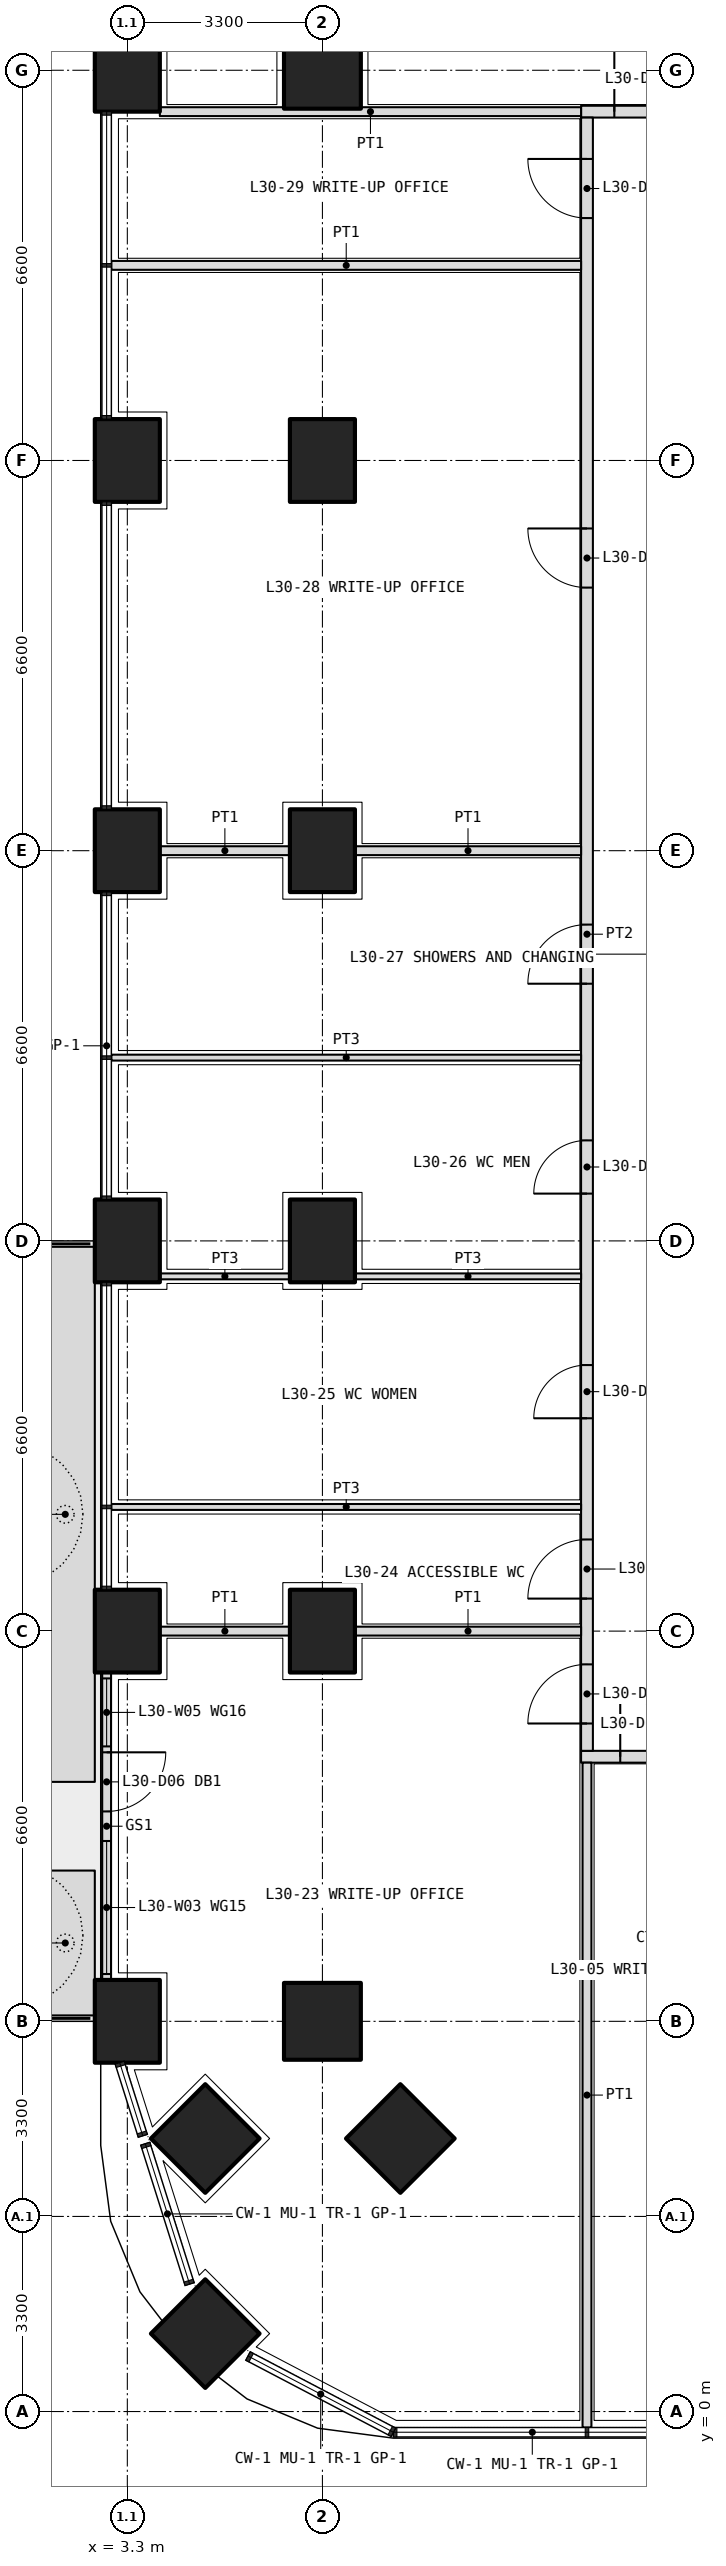
"""IFC4 building model, lengths in metres.
Left out: names, types, materials, properties, quantities, classifications, styles, units other than length and angle.
Written with IfcOpenShell. Run it as: python <this file> out.ifc"""

import sys

from ifc_helpers import new_model, si_unit, direction, frame, frame_2d, origin, origin_2d, place, context, subcontext, project, spatial, polyline, rectangle, outline, extrude, element, fill, save


model = new_model("IFC4")
c1 = context("Model", 3, precision=1e-05, world=origin(), true_north=direction((0.0, 1.0)))
c2 = subcontext(c1, "Body", "Model", "MODEL_VIEW")
j1 = project(units=[si_unit("LENGTHUNIT", "METRE"), si_unit("PLANEANGLEUNIT", "RADIAN")], contexts=[c1])
p1 = place(None, origin())
s1 = spatial("IfcSite", under=j1, at=p1, CompositionType="ELEMENT")
p2 = place(p1, origin())
s2 = spatial("IfcBuilding", under=s1, at=p2, CompositionType="ELEMENT")
p3 = place(p2, frame((0.0, 0.0, 132.6)))
s3 = spatial("IfcBuildingStorey", under=s2, at=p3, CompositionType="ELEMENT", Elevation=132.6)
p4 = place(p3, frame((4.618, 1.318, 0.0), z_axis=(0.0, 0.0, 1.0), x_axis=(0.707106781187, 0.707106781187, 0.0)))
e1 = element("IfcColumn", 1, at=p4, inside=s3, PredefinedType="COLUMN", context=c2, shape_type="SweptSolid", body=[
    extrude(rectangle(XDim=1.3, YDim=1.3, at=origin_2d()), origin(), (0.0, 0.0, 1.0), 4.2),
])
for number, where, z_axis, x_axis in (
    (2, (3.3, 6.6, 0.0), (0.0, 0.0, 1.0), (0.0, 1.0, 0.0)),
    (3, (3.3, 13.2, 0.0), (0.0, 0.0, 1.0), (0.0, 1.0, 0.0)),
    (4, (3.3, 19.8, 0.0), (0.0, 0.0, 1.0), (0.0, 1.0, 0.0)),
    (5, (3.3, 26.4, 0.0), (0.0, 0.0, 1.0), (0.0, 1.0, 0.0)),
    (6, (3.3, 33.0, 0.0), (0.0, 0.0, 1.0), (0.0, 1.0, 0.0)),
    (7, (3.3, 39.6, 0.0), (0.0, 0.0, 1.0), (0.0, 1.0, 0.0)),
):
    element("IfcColumn", number, at=place(p3, frame(where, z_axis=z_axis, x_axis=x_axis)), inside=s3, PredefinedType="COLUMN", context=c2, shape_type="SweptSolid", body=[
        extrude(rectangle(XDim=1.4, YDim=1.1, at=origin_2d()), origin(), (0.0, 0.0, 1.0), 4.2),
    ])
for number, where, z_axis, x_axis in (
    (8, (6.6, 6.6, 0.0), (0.0, 0.0, 1.0), (1.0, 0.0, 0.0)),
    (9, (6.6, 39.6, 0.0), (0.0, 0.0, 1.0), (1.0, 0.0, 0.0)),
    (10, (4.618, 4.618, 0.0), (0.0, 0.0, 1.0), (0.707, 0.707, 0.0)),
    (11, (7.918, 4.618, 0.0), (0.0, 0.0, 1.0), (0.707, 0.707, 0.0)),
):
    element("IfcColumn", number, at=place(p3, frame(where, z_axis=z_axis, x_axis=x_axis)), inside=s3, PredefinedType="COLUMN", context=c2, shape_type="SweptSolid", body=[
        extrude(rectangle(XDim=1.3, YDim=1.3, at=origin_2d()), origin(), (0.0, 0.0, 1.0), 4.2),
    ])
for number, where, z_axis, x_axis in (
    (12, (6.6, 13.2, 0.0), (0.0, 0.0, 1.0), (0.0, 1.0, 0.0)),
    (13, (6.6, 19.8, 0.0), (0.0, 0.0, 1.0), (0.0, 1.0, 0.0)),
    (14, (6.6, 26.4, 0.0), (0.0, 0.0, 1.0), (0.0, 1.0, 0.0)),
    (15, (6.6, 33.0, 0.0), (0.0, 0.0, 1.0), (0.0, 1.0, 0.0)),
):
    element("IfcColumn", number, at=place(p3, frame(where, z_axis=z_axis, x_axis=x_axis)), inside=s3, PredefinedType="COLUMN", context=c2, shape_type="SweptSolid", body=[
        extrude(rectangle(XDim=1.4, YDim=1.1, at=origin_2d()), origin(), (0.0, 0.0, 1.0), 4.2),
    ])
p5 = place(p3, origin())
e16 = element("IfcWall", 16, at=p5, inside=s3, PredefinedType="USERDEFINED", context=c2, shape_type="SweptSolid", body=[
    extrude(outline(polyline([(1.75, 6.7), (2.75, 6.7), (2.75, 9.15), (1.75, 9.15), (1.75, 6.7)]), holes=[polyline([(1.9, 6.85), (2.6, 6.85), (2.6, 9.0), (1.9, 9.0), (1.9, 6.85)])]), origin(), (0.0, 0.0, 1.0), 1.05),
])
p6 = place(p3, origin())
e17 = element("IfcWall", 17, at=p6, inside=s3, PredefinedType="USERDEFINED", context=c2, shape_type="SweptSolid", body=[
    extrude(outline(polyline([(1.75, 10.65), (2.75, 10.65), (2.75, 19.7), (1.75, 19.7), (1.75, 10.65)]), holes=[polyline([(1.9, 10.8), (2.6, 10.8), (2.6, 19.55), (1.9, 19.55), (1.9, 10.8)])]), origin(), (0.0, 0.0, 1.0), 1.05),
])
p7 = place(p3, frame((2.95, 12.5, 0.0), z_axis=(0.0, 0.0, 1.0), x_axis=(0.0, -1.0, 0.0)))
e18 = element("IfcWall", 18, at=p7, inside=s3, PredefinedType="SOLIDWALL", context=c2, shape_type="SweptSolid", body=[
    extrude(rectangle(XDim=5.2, YDim=0.15, at=frame_2d((2.6, 0.0))), origin(), (0.0, 0.0, 1.0), 2.7),
])
p8 = place(p7, frame((1.35, 0.0, 0.0)))
e19 = element("IfcOpeningElement", 19, at=p8, cuts=e18, PredefinedType="OPENING", context=c2, shape_type="SweptSolid", body=[
    extrude(rectangle(XDim=1.0, YDim=2.4, at=frame_2d((0.5, 1.2))), frame((0.0, 0.085, 0.0), z_axis=(0.0, -1.0, 0.0), x_axis=(1.0, 0.0, 0.0)), (0.0, 0.0, 1.0), 0.17),
])
p9 = place(p7, frame((0.1, 0.0, 0.1)))
e20 = element("IfcOpeningElement", 20, at=p9, cuts=e18, PredefinedType="OPENING", context=c2, shape_type="SweptSolid", body=[
    extrude(rectangle(XDim=1.15, YDim=2.3, at=frame_2d((0.575, 1.15))), frame((0.0, 0.085, 0.0), z_axis=(0.0, -1.0, 0.0), x_axis=(1.0, 0.0, 0.0)), (0.0, 0.0, 1.0), 0.17),
])
p10 = place(p7, frame((2.85, 0.0, 0.1)))
e21 = element("IfcOpeningElement", 21, at=p10, cuts=e18, PredefinedType="OPENING", context=c2, shape_type="SweptSolid", body=[
    extrude(rectangle(XDim=2.25, YDim=2.3, at=frame_2d((1.125, 1.15))), frame((0.0, 0.085, 0.0), z_axis=(0.0, -1.0, 0.0), x_axis=(1.0, 0.0, 0.0)), (0.0, 0.0, 1.0), 0.17),
])
p11 = place(p3, frame((10.975, 11.075, 0.0), z_axis=(0.0, 0.0, 1.0), x_axis=(1.0, 0.0, 0.0)))
e22 = element("IfcWall", 22, at=p11, inside=s3, PredefinedType="PARTITIONING", context=c2, shape_type="SweptSolid", body=[
    extrude(rectangle(XDim=12.125, YDim=0.2, at=frame_2d((6.062, 0.0))), origin(), (0.0, 0.0, 1.0), 2.85),
])
p12 = place(p11, frame((0.663, 0.0, 0.0)))
e23 = element("IfcOpeningElement", 23, at=p12, cuts=e22, PredefinedType="OPENING", context=c2, shape_type="SweptSolid", body=[
    extrude(rectangle(XDim=1.0, YDim=2.1, at=frame_2d((0.5, 1.05))), frame((0.0, 0.11, 0.0), z_axis=(0.0, -1.0, 0.0), x_axis=(1.0, 0.0, 0.0)), (0.0, 0.0, 1.0), 0.22),
])
p13 = place(p11, frame((6.675, 0.0, 0.0)))
e24 = element("IfcOpeningElement", 24, at=p13, cuts=e22, PredefinedType="OPENING", context=c2, shape_type="SweptSolid", body=[
    extrude(rectangle(XDim=1.0, YDim=2.1, at=frame_2d((0.5, 1.05))), frame((0.0, 0.11, 0.0), z_axis=(0.0, -1.0, 0.0), x_axis=(1.0, 0.0, 0.0)), (0.0, 0.0, 1.0), 0.22),
])
p14 = place(p3, frame((10.975, 38.9, 0.0), z_axis=(0.0, 0.0, 1.0), x_axis=(1.0, 0.0, 0.0)))
e25 = element("IfcWall", 25, at=p14, inside=s3, PredefinedType="PARTITIONING", context=c2, shape_type="SweptSolid", body=[
    extrude(rectangle(XDim=30.85, YDim=0.2, at=frame_2d((15.425, 0.0))), origin(), (0.0, 0.0, 1.0), 2.85),
])
p15 = place(p14, frame((0.562, 0.0, 0.0)))
e26 = element("IfcOpeningElement", 26, at=p15, cuts=e25, PredefinedType="OPENING", context=c2, shape_type="SweptSolid", body=[
    extrude(rectangle(XDim=1.2, YDim=2.1, at=frame_2d((0.6, 1.05))), frame((0.0, 0.11, 0.0), z_axis=(0.0, -1.0, 0.0), x_axis=(1.0, 0.0, 0.0)), (0.0, 0.0, 1.0), 0.22),
])
p16 = place(p14, frame((6.675, 0.0, 0.0)))
e27 = element("IfcOpeningElement", 27, at=p16, cuts=e25, PredefinedType="OPENING", context=c2, shape_type="SweptSolid", body=[
    extrude(rectangle(XDim=1.0, YDim=2.1, at=frame_2d((0.5, 1.05))), frame((0.0, 0.11, 0.0), z_axis=(0.0, -1.0, 0.0), x_axis=(1.0, 0.0, 0.0)), (0.0, 0.0, 1.0), 0.22),
])
p17 = place(p14, frame((16.575, 0.0, 0.0)))
e28 = element("IfcOpeningElement", 28, at=p17, cuts=e25, PredefinedType="OPENING", context=c2, shape_type="SweptSolid", body=[
    extrude(rectangle(XDim=1.0, YDim=2.1, at=frame_2d((0.5, 1.05))), frame((0.0, 0.11, 0.0), z_axis=(0.0, -1.0, 0.0), x_axis=(1.0, 0.0, 0.0)), (0.0, 0.0, 1.0), 0.22),
])
p18 = place(p14, frame((25.887, 0.0, 0.0)))
e29 = element("IfcOpeningElement", 29, at=p18, cuts=e25, PredefinedType="OPENING", context=c2, shape_type="SweptSolid", body=[
    extrude(rectangle(XDim=1.0, YDim=2.1, at=frame_2d((0.5, 1.05))), frame((0.0, 0.11, 0.0), z_axis=(0.0, -1.0, 0.0), x_axis=(1.0, 0.0, 0.0)), (0.0, 0.0, 1.0), 0.22),
])
p19 = place(p3, frame((11.075, 11.175, 0.0), z_axis=(0.0, 0.0, 1.0), x_axis=(0.0, 1.0, 0.0)))
e30 = element("IfcWall", 30, at=p19, inside=s3, PredefinedType="PARTITIONING", context=c2, shape_type="SweptSolid", body=[
    extrude(rectangle(XDim=27.625, YDim=0.2, at=frame_2d((13.812, 0.0))), origin(), (0.0, 0.0, 1.0), 2.85),
])
p20 = place(p19, frame((0.462, 0.0, 0.0)))
e31 = element("IfcOpeningElement", 31, at=p20, cuts=e30, PredefinedType="OPENING", context=c2, shape_type="SweptSolid", body=[
    extrude(rectangle(XDim=1.0, YDim=2.1, at=frame_2d((0.5, 1.05))), frame((0.0, 0.11, 0.0), z_axis=(0.0, -1.0, 0.0), x_axis=(1.0, 0.0, 0.0)), (0.0, 0.0, 1.0), 0.22),
])
p21 = place(p19, frame((2.575, 0.0, 0.0)))
e32 = element("IfcOpeningElement", 32, at=p21, cuts=e30, PredefinedType="OPENING", context=c2, shape_type="SweptSolid", body=[
    extrude(rectangle(XDim=1.0, YDim=2.1, at=frame_2d((0.5, 1.05))), frame((0.0, 0.11, 0.0), z_axis=(0.0, -1.0, 0.0), x_axis=(1.0, 0.0, 0.0)), (0.0, 0.0, 1.0), 0.22),
])
p22 = place(p19, frame((5.625, 0.0, 0.0)))
e33 = element("IfcOpeningElement", 33, at=p22, cuts=e30, PredefinedType="OPENING", context=c2, shape_type="SweptSolid", body=[
    extrude(rectangle(XDim=0.9, YDim=2.1, at=frame_2d((0.45, 1.05))), frame((0.0, 0.11, 0.0), z_axis=(0.0, -1.0, 0.0), x_axis=(1.0, 0.0, 0.0)), (0.0, 0.0, 1.0), 0.22),
])
p23 = place(p19, frame((9.425, 0.0, 0.0)))
e34 = element("IfcOpeningElement", 34, at=p23, cuts=e30, PredefinedType="OPENING", context=c2, shape_type="SweptSolid", body=[
    extrude(rectangle(XDim=0.9, YDim=2.1, at=frame_2d((0.45, 1.05))), frame((0.0, 0.11, 0.0), z_axis=(0.0, -1.0, 0.0), x_axis=(1.0, 0.0, 0.0)), (0.0, 0.0, 1.0), 0.22),
])
p24 = place(p19, frame((12.975, 0.0, 0.0)))
e35 = element("IfcOpeningElement", 35, at=p24, cuts=e30, PredefinedType="OPENING", context=c2, shape_type="SweptSolid", body=[
    extrude(rectangle(XDim=1.0, YDim=2.1, at=frame_2d((0.5, 1.05))), frame((0.0, 0.11, 0.0), z_axis=(0.0, -1.0, 0.0), x_axis=(1.0, 0.0, 0.0)), (0.0, 0.0, 1.0), 0.22),
])
p25 = place(p19, frame((19.675, 0.0, 0.0)))
e36 = element("IfcOpeningElement", 36, at=p25, cuts=e30, PredefinedType="OPENING", context=c2, shape_type="SweptSolid", body=[
    extrude(rectangle(XDim=1.0, YDim=2.1, at=frame_2d((0.5, 1.05))), frame((0.0, 0.11, 0.0), z_axis=(0.0, -1.0, 0.0), x_axis=(1.0, 0.0, 0.0)), (0.0, 0.0, 1.0), 0.22),
])
p26 = place(p19, frame((25.925, 0.0, 0.0)))
e37 = element("IfcOpeningElement", 37, at=p26, cuts=e30, PredefinedType="OPENING", context=c2, shape_type="SweptSolid", body=[
    extrude(rectangle(XDim=1.0, YDim=2.1, at=frame_2d((0.5, 1.05))), frame((0.0, 0.11, 0.0), z_axis=(0.0, -1.0, 0.0), x_axis=(1.0, 0.0, 0.0)), (0.0, 0.0, 1.0), 0.22),
])
p27 = place(p3, frame((11.075, -0.27, 0.0), z_axis=(0.0, 0.0, 1.0), x_axis=(0.0, 1.0, 0.0)))
e38 = element("IfcWall", 38, at=p27, inside=s3, PredefinedType="PARTITIONING", context=c2, shape_type="SweptSolid", body=[
    extrude(rectangle(XDim=11.245, YDim=0.15, at=frame_2d((5.623, 0.0))), origin(), (0.0, 0.0, 1.0), 2.7),
])
p28 = place(p3, frame((3.85, 38.9, 0.0), z_axis=(0.0, 0.0, 1.0), x_axis=(1.0, 0.0, 0.0)))
e39 = element("IfcWall", 39, at=p28, inside=s3, PredefinedType="PARTITIONING", context=c2, shape_type="SweptSolid", body=[
    extrude(rectangle(XDim=7.125, YDim=0.15, at=frame_2d((3.562, 0.0))), origin(), (0.0, 0.0, 1.0), 2.85),
])
p29 = place(p3, frame((3.03, 15.3, 0.0), z_axis=(0.0, 0.0, 1.0), x_axis=(1.0, 0.0, 0.0)))
e40 = element("IfcWall", 40, at=p29, inside=s3, PredefinedType="PARTITIONING", context=c2, shape_type="SweptSolid", body=[
    extrude(rectangle(XDim=7.945, YDim=0.1, at=frame_2d((3.973, 0.0))), origin(), (0.0, 0.0, 1.0), 2.7),
])
p30 = place(p3, frame((3.85, 19.2, 0.0), z_axis=(0.0, 0.0, 1.0), x_axis=(1.0, 0.0, 0.0)))
e41 = element("IfcWall", 41, at=p30, inside=s3, PredefinedType="PARTITIONING", context=c2, shape_type="SweptSolid", body=[
    extrude(rectangle(XDim=2.2, YDim=0.1, at=frame_2d((1.1, 0.0))), origin(), (0.0, 0.0, 1.0), 2.85),
])
p31 = place(p3, frame((7.15, 19.2, 0.0), z_axis=(0.0, 0.0, 1.0), x_axis=(1.0, 0.0, 0.0)))
e42 = element("IfcWall", 42, at=p31, inside=s3, PredefinedType="PARTITIONING", context=c2, shape_type="SweptSolid", body=[
    extrude(rectangle(XDim=3.825, YDim=0.1, at=frame_2d((1.913, 0.0))), origin(), (0.0, 0.0, 1.0), 2.85),
])
p32 = place(p3, frame((3.03, 22.9, 0.0), z_axis=(0.0, 0.0, 1.0), x_axis=(1.0, 0.0, 0.0)))
e43 = element("IfcWall", 43, at=p32, inside=s3, PredefinedType="PARTITIONING", context=c2, shape_type="SweptSolid", body=[
    extrude(rectangle(XDim=7.945, YDim=0.1, at=frame_2d((3.973, 0.0))), origin(), (0.0, 0.0, 1.0), 2.7),
])
p33 = place(p3, frame((3.85, 13.2, 0.0), z_axis=(0.0, 0.0, 1.0), x_axis=(1.0, 0.0, 0.0)))
e44 = element("IfcWall", 44, at=p33, inside=s3, PredefinedType="PARTITIONING", context=c2, shape_type="SweptSolid", body=[
    extrude(rectangle(XDim=2.2, YDim=0.15, at=frame_2d((1.1, 0.0))), origin(), (0.0, 0.0, 1.0), 2.85),
])
p34 = place(p3, frame((7.15, 13.2, 0.0), z_axis=(0.0, 0.0, 1.0), x_axis=(1.0, 0.0, 0.0)))
e45 = element("IfcWall", 45, at=p34, inside=s3, PredefinedType="PARTITIONING", context=c2, shape_type="SweptSolid", body=[
    extrude(rectangle(XDim=3.825, YDim=0.15, at=frame_2d((1.913, 0.0))), origin(), (0.0, 0.0, 1.0), 2.85),
])
p35 = place(p3, frame((3.85, 26.4, 0.0), z_axis=(0.0, 0.0, 1.0), x_axis=(1.0, 0.0, 0.0)))
e46 = element("IfcWall", 46, at=p35, inside=s3, PredefinedType="PARTITIONING", context=c2, shape_type="SweptSolid", body=[
    extrude(rectangle(XDim=2.2, YDim=0.15, at=frame_2d((1.1, 0.0))), origin(), (0.0, 0.0, 1.0), 2.85),
])
p36 = place(p3, frame((7.15, 26.4, 0.0), z_axis=(0.0, 0.0, 1.0), x_axis=(1.0, 0.0, 0.0)))
e47 = element("IfcWall", 47, at=p36, inside=s3, PredefinedType="PARTITIONING", context=c2, shape_type="SweptSolid", body=[
    extrude(rectangle(XDim=3.825, YDim=0.15, at=frame_2d((1.913, 0.0))), origin(), (0.0, 0.0, 1.0), 2.85),
])
p37 = place(p3, frame((3.03, 36.3, 0.0), z_axis=(0.0, 0.0, 1.0), x_axis=(1.0, 0.0, 0.0)))
e48 = element("IfcWall", 48, at=p37, inside=s3, PredefinedType="PARTITIONING", context=c2, shape_type="SweptSolid", body=[
    extrude(rectangle(XDim=7.945, YDim=0.15, at=frame_2d((3.973, 0.0))), origin(), (0.0, 0.0, 1.0), 2.7),
])
p38 = place(p8, origin())
e49 = element("IfcDoor", 49, at=p38, inside=s3, OperationType="SINGLE_SWING_LEFT", PredefinedType="DOOR", context=c2, shape_type="SweptSolid", body=[
    extrude(rectangle(XDim=1.0, YDim=2.4, at=frame_2d((0.5, 1.2))), frame((0.0, 0.025, 0.0), z_axis=(0.0, -1.0, 0.0), x_axis=(1.0, 0.0, 0.0)), (0.0, 0.0, 1.0), 0.05),
])
fill(e19, e49)
p39 = place(p9, origin())
e50 = element("IfcWindow", 50, at=p39, inside=s3, PartitioningType="SINGLE_PANEL", PredefinedType="WINDOW", context=c2, shape_type="SweptSolid", body=[
    extrude(rectangle(XDim=1.15, YDim=2.3, at=frame_2d((0.575, 1.15))), frame((0.0, 0.03, 0.0), z_axis=(0.0, -1.0, 0.0), x_axis=(1.0, 0.0, 0.0)), (0.0, 0.0, 1.0), 0.06),
])
fill(e20, e50)
p40 = place(p10, origin())
e51 = element("IfcWindow", 51, at=p40, inside=s3, PartitioningType="SINGLE_PANEL", PredefinedType="WINDOW", context=c2, shape_type="SweptSolid", body=[
    extrude(rectangle(XDim=2.25, YDim=2.3, at=frame_2d((1.125, 1.15))), frame((0.0, 0.03, 0.0), z_axis=(0.0, -1.0, 0.0), x_axis=(1.0, 0.0, 0.0)), (0.0, 0.0, 1.0), 0.06),
])
fill(e21, e51)
p41 = place(p12, origin())
e52 = element("IfcDoor", 52, at=p41, inside=s3, OperationType="SINGLE_SWING_LEFT", PredefinedType="DOOR", context=c2, shape_type="SweptSolid", body=[
    extrude(rectangle(XDim=1.0, YDim=2.1, at=frame_2d((0.5, 1.05))), frame((0.0, 0.025, 0.0), z_axis=(0.0, -1.0, 0.0), x_axis=(1.0, 0.0, 0.0)), (0.0, 0.0, 1.0), 0.05),
])
fill(e23, e52)
p42 = place(p15, origin())
e53 = element("IfcDoor", 53, at=p42, inside=s3, OperationType="DOUBLE_DOOR_SINGLE_SWING", PredefinedType="DOOR", context=c2, shape_type="SweptSolid", body=[
    extrude(rectangle(XDim=1.2, YDim=2.1, at=frame_2d((0.6, 1.05))), frame((0.0, 0.025, 0.0), z_axis=(0.0, -1.0, 0.0), x_axis=(1.0, 0.0, 0.0)), (0.0, 0.0, 1.0), 0.05),
])
fill(e26, e53)
p43 = place(p20, origin())
e54 = element("IfcDoor", 54, at=p43, inside=s3, OperationType="SINGLE_SWING_LEFT", PredefinedType="DOOR", context=c2, shape_type="SweptSolid", body=[
    extrude(rectangle(XDim=1.0, YDim=2.1, at=frame_2d((0.5, 1.05))), frame((0.0, 0.025, 0.0), z_axis=(0.0, -1.0, 0.0), x_axis=(1.0, 0.0, 0.0)), (0.0, 0.0, 1.0), 0.05),
])
fill(e31, e54)
p44 = place(p21, origin())
e55 = element("IfcDoor", 55, at=p44, inside=s3, OperationType="SINGLE_SWING_LEFT", PredefinedType="DOOR", context=c2, shape_type="SweptSolid", body=[
    extrude(rectangle(XDim=1.0, YDim=2.1, at=frame_2d((0.5, 1.05))), frame((0.0, 0.025, 0.0), z_axis=(0.0, -1.0, 0.0), x_axis=(1.0, 0.0, 0.0)), (0.0, 0.0, 1.0), 0.05),
])
fill(e32, e55)
p45 = place(p22, origin())
e56 = element("IfcDoor", 56, at=p45, inside=s3, OperationType="SINGLE_SWING_LEFT", PredefinedType="DOOR", context=c2, shape_type="SweptSolid", body=[
    extrude(rectangle(XDim=0.9, YDim=2.1, at=frame_2d((0.45, 1.05))), frame((0.0, 0.025, 0.0), z_axis=(0.0, -1.0, 0.0), x_axis=(1.0, 0.0, 0.0)), (0.0, 0.0, 1.0), 0.05),
])
fill(e33, e56)
p46 = place(p23, origin())
e57 = element("IfcDoor", 57, at=p46, inside=s3, OperationType="SINGLE_SWING_LEFT", PredefinedType="DOOR", context=c2, shape_type="SweptSolid", body=[
    extrude(rectangle(XDim=0.9, YDim=2.1, at=frame_2d((0.45, 1.05))), frame((0.0, 0.025, 0.0), z_axis=(0.0, -1.0, 0.0), x_axis=(1.0, 0.0, 0.0)), (0.0, 0.0, 1.0), 0.05),
])
fill(e34, e57)
p47 = place(p24, origin())
e58 = element("IfcDoor", 58, at=p47, inside=s3, OperationType="SINGLE_SWING_LEFT", PredefinedType="DOOR", context=c2, shape_type="SweptSolid", body=[
    extrude(rectangle(XDim=1.0, YDim=2.1, at=frame_2d((0.5, 1.05))), frame((0.0, 0.025, 0.0), z_axis=(0.0, -1.0, 0.0), x_axis=(1.0, 0.0, 0.0)), (0.0, 0.0, 1.0), 0.05),
])
fill(e35, e58)
p48 = place(p25, origin())
e59 = element("IfcDoor", 59, at=p48, inside=s3, OperationType="SINGLE_SWING_RIGHT", PredefinedType="DOOR", context=c2, shape_type="SweptSolid", body=[
    extrude(rectangle(XDim=1.0, YDim=2.1, at=frame_2d((0.5, 1.05))), frame((0.0, 0.025, 0.0), z_axis=(0.0, -1.0, 0.0), x_axis=(1.0, 0.0, 0.0)), (0.0, 0.0, 1.0), 0.05),
])
fill(e36, e59)
p49 = place(p26, origin())
e60 = element("IfcDoor", 60, at=p49, inside=s3, OperationType="SINGLE_SWING_RIGHT", PredefinedType="DOOR", context=c2, shape_type="SweptSolid", body=[
    extrude(rectangle(XDim=1.0, YDim=2.1, at=frame_2d((0.5, 1.05))), frame((0.0, 0.025, 0.0), z_axis=(0.0, -1.0, 0.0), x_axis=(1.0, 0.0, 0.0)), (0.0, 0.0, 1.0), 0.05),
])
fill(e37, e60)
save(model, sys.argv[1])
